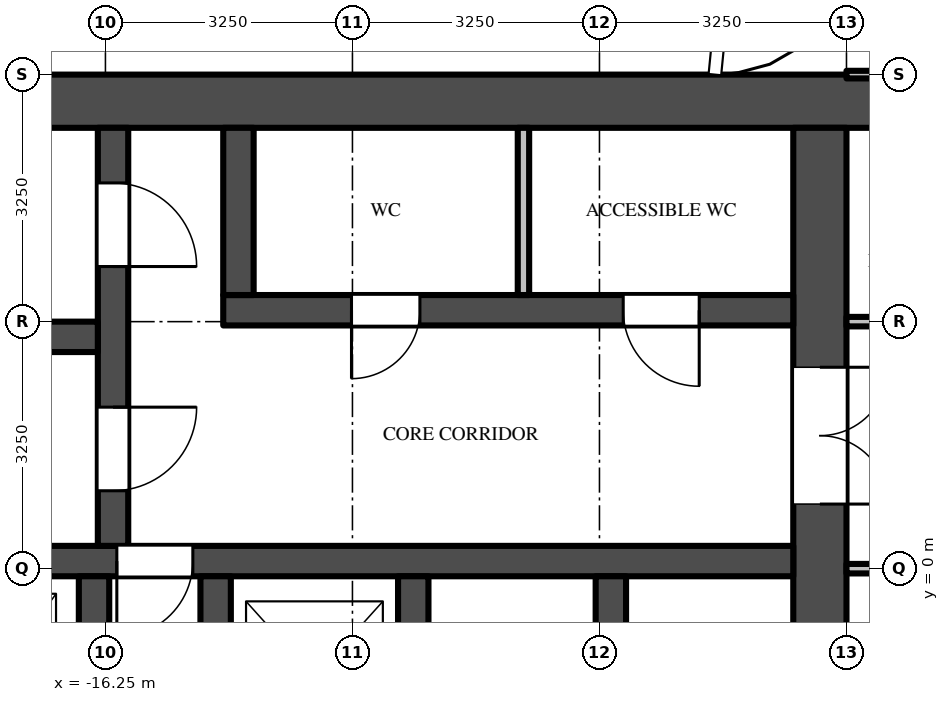
"""IFC4 building model, lengths in metres.
Left out: names, types, materials, properties, quantities, classifications, styles, units other than length and angle.
Written with IfcOpenShell. Run it as: python <this file> out.ifc"""

import sys

from ifc_helpers import new_model, si_unit, direction, frame, frame_2d, origin, place, context, subcontext, project, spatial, rectangle, extrude, source, transform, mapped, element, fill, save


model = new_model("IFC4")
c1 = context("Model", 3, precision=1e-05, world=origin(), true_north=direction((0.0, 1.0)))
c2 = subcontext(c1, "Body", "Model", "MODEL_VIEW")
j1 = project(units=[si_unit("LENGTHUNIT", "METRE"), si_unit("PLANEANGLEUNIT", "RADIAN")], contexts=[c1])
p1 = place(None, origin())
s1 = spatial("IfcSite", under=j1, at=p1, CompositionType="ELEMENT")
p2 = place(p1, origin())
s2 = spatial("IfcBuilding", under=s1, at=p2, CompositionType="ELEMENT")
p3 = place(p2, frame((0.0, 0.0, 267.5)))
s3 = spatial("IfcBuildingStorey", under=s2, at=p3, CompositionType="ELEMENT", Elevation=267.5)
m1 = source(origin(), c2, "Body", "SweptSolid", [
    extrude(rectangle(XDim=16.6, YDim=0.7, at=frame_2d((8.3, 0.0))), origin(), (0.0, 0.0, 1.0), 3.45),
])
p4 = place(p3, frame((-6.15, 6.15, 0.0), z_axis=(0.0, 0.0, 1.0), x_axis=(-1.0, 0.0, 0.0)))
e1 = element("IfcWall", 1, at=p4, inside=s3, PredefinedType="SHEAR", context=c2, shape_type="MappedRepresentation", body=[
    mapped(m1, transform((0.0, 0.0, 0.0))),
])
m2 = source(origin(), c2, "Body", "SweptSolid", [
    extrude(rectangle(XDim=9.05, YDim=0.7, at=frame_2d((4.525, 0.0))), origin(), (0.0, 0.0, 1.0), 3.45),
])
p5 = place(p3, frame((-6.85, 5.8, 0.0), z_axis=(0.0, 0.0, 1.0), x_axis=(0.0, -1.0, 0.0)))
e2 = element("IfcWall", 2, at=p5, inside=s3, PredefinedType="SHEAR", context=c2, shape_type="MappedRepresentation", body=[
    mapped(m2, transform((0.0, 0.0, 0.0))),
])
m3 = source(origin(), c2, "Body", "SweptSolid", [
    extrude(rectangle(XDim=1.8, YDim=2.1, at=frame_2d((0.9, 1.05))), frame((0.0, 0.36, 0.0), z_axis=(0.0, -1.0, 0.0), x_axis=(1.0, 0.0, 0.0)), (0.0, 0.0, 1.0), 0.72),
])
p6 = place(p5, frame((3.15, 0.0, 0.0)))
e3 = element("IfcOpeningElement", 3, at=p6, cuts=e2, PredefinedType="OPENING", context=c2, shape_type="MappedRepresentation", body=[
    mapped(m3, transform((0.0, 0.0, 0.0))),
])
m4 = source(origin(), c2, "Body", "SweptSolid", [
    extrude(rectangle(XDim=7.5, YDim=0.4, at=frame_2d((3.75, 0.0))), origin(), (0.0, 0.0, 1.0), 3.45),
])
p7 = place(p3, frame((-7.2, 3.4, 0.0), z_axis=(0.0, 0.0, 1.0), x_axis=(-1.0, 0.0, 0.0)))
e4 = element("IfcWall", 4, at=p7, inside=s3, PredefinedType="SHEAR", context=c2, shape_type="MappedRepresentation", body=[
    mapped(m4, transform((0.0, 0.0, 0.0))),
])
m5 = source(origin(), c2, "Body", "SweptSolid", [
    extrude(rectangle(XDim=1.0, YDim=2.1, at=frame_2d((0.5, 1.05))), frame((0.0, 0.21, 0.0), z_axis=(0.0, -1.0, 0.0), x_axis=(1.0, 0.0, 0.0)), (0.0, 0.0, 1.0), 0.42),
])
p8 = place(p7, frame((1.238, 0.0, 0.0)))
e5 = element("IfcOpeningElement", 5, at=p8, cuts=e4, PredefinedType="OPENING", context=c2, shape_type="MappedRepresentation", body=[
    mapped(m5, transform((0.0, 0.0, 0.0))),
])
m6 = source(origin(), c2, "Body", "SweptSolid", [
    extrude(rectangle(XDim=0.9, YDim=2.1, at=frame_2d((0.45, 1.05))), frame((0.0, 0.21, 0.0), z_axis=(0.0, -1.0, 0.0), x_axis=(1.0, 0.0, 0.0)), (0.0, 0.0, 1.0), 0.42),
])
p9 = place(p7, frame((4.913, 0.0, 0.0)))
e6 = element("IfcOpeningElement", 6, at=p9, cuts=e4, PredefinedType="OPENING", context=c2, shape_type="MappedRepresentation", body=[
    mapped(m6, transform((0.0, 0.0, 0.0))),
])
m7 = source(origin(), c2, "Body", "SweptSolid", [
    extrude(rectangle(XDim=14.85, YDim=0.4, at=frame_2d((7.425, 0.0))), origin(), (0.0, 0.0, 1.0), 3.45),
])
p10 = place(p3, frame((-7.2, 0.1, 0.0), z_axis=(0.0, 0.0, 1.0), x_axis=(-1.0, 0.0, 0.0)))
e7 = element("IfcWall", 7, at=p10, inside=s3, PredefinedType="SHEAR", context=c2, shape_type="MappedRepresentation", body=[
    mapped(m7, transform((0.0, 0.0, 0.0))),
])
p11 = place(p10, frame((7.9, 0.0, 0.0)))
e8 = element("IfcOpeningElement", 8, at=p11, cuts=e7, PredefinedType="OPENING", context=c2, shape_type="MappedRepresentation", body=[
    mapped(m5, transform((0.0, 0.0, 0.0))),
])
m8 = source(origin(), c2, "Body", "SweptSolid", [
    extrude(rectangle(XDim=5.5, YDim=0.4, at=frame_2d((2.75, 0.0))), origin(), (0.0, 0.0, 1.0), 3.45),
])
p12 = place(p3, frame((-16.15, 5.8, 0.0), z_axis=(0.0, 0.0, 1.0), x_axis=(0.0, -1.0, 0.0)))
e9 = element("IfcWall", 9, at=p12, inside=s3, PredefinedType="SHEAR", context=c2, shape_type="MappedRepresentation", body=[
    mapped(m8, transform((0.0, 0.0, 0.0))),
])
m9 = source(origin(), c2, "Body", "SweptSolid", [
    extrude(rectangle(XDim=1.1, YDim=2.1, at=frame_2d((0.55, 1.05))), frame((0.0, 0.21, 0.0), z_axis=(0.0, -1.0, 0.0), x_axis=(1.0, 0.0, 0.0)), (0.0, 0.0, 1.0), 0.42),
])
p13 = place(p12, frame((0.725, 0.0, 0.0)))
e10 = element("IfcOpeningElement", 10, at=p13, cuts=e9, PredefinedType="OPENING", context=c2, shape_type="MappedRepresentation", body=[
    mapped(m9, transform((0.0, 0.0, 0.0))),
])
p14 = place(p12, frame((3.675, 0.0, 0.0)))
e11 = element("IfcOpeningElement", 11, at=p14, cuts=e9, PredefinedType="OPENING", context=c2, shape_type="MappedRepresentation", body=[
    mapped(m9, transform((0.0, 0.0, 0.0))),
])
m10 = source(origin(), c2, "Body", "SweptSolid", [
    extrude(rectangle(XDim=5.7, YDim=0.4, at=frame_2d((2.85, 0.0))), origin(), (0.0, 0.0, 1.0), 3.45),
])
p15 = place(p3, frame((-16.35, 3.05, 0.0), z_axis=(0.0, 0.0, 1.0), x_axis=(-1.0, 0.0, 0.0)))
e12 = element("IfcWall", 12, at=p15, inside=s3, PredefinedType="SHEAR", context=c2, shape_type="MappedRepresentation", body=[
    mapped(m10, transform((0.0, 0.0, 0.0))),
])
m11 = source(origin(), c2, "Body", "SweptSolid", [
    extrude(rectangle(XDim=2.2, YDim=0.4, at=frame_2d((1.1, 0.0))), origin(), (0.0, 0.0, 1.0), 3.45),
])
p16 = place(p3, frame((-14.5, 5.8, 0.0), z_axis=(0.0, 0.0, 1.0), x_axis=(0.0, -1.0, 0.0)))
e13 = element("IfcWall", 13, at=p16, inside=s3, PredefinedType="SHEAR", context=c2, shape_type="MappedRepresentation", body=[
    mapped(m11, transform((0.0, 0.0, 0.0))),
])
m12 = source(origin(), c2, "Body", "SweptSolid", [
    extrude(rectangle(XDim=2.45, YDim=0.4, at=frame_2d((1.225, 0.0))), origin(), (0.0, 0.0, 1.0), 3.45),
])
for number, where, z_axis, x_axis in (
    (14, (-9.6, -0.1, 0.0), (0.0, 0.0, 1.0), (0.0, -1.0, 0.0)),
    (15, (-12.2, -0.1, 0.0), (0.0, 0.0, 1.0), (0.0, -1.0, 0.0)),
    (16, (-14.8, -0.1, 0.0), (0.0, 0.0, 1.0), (0.0, -1.0, 0.0)),
    (17, (-16.4, -0.1, 0.0), (0.0, 0.0, 1.0), (0.0, -1.0, 0.0)),
):
    element("IfcWall", number, at=place(p3, frame(where, z_axis=z_axis, x_axis=x_axis)), inside=s3, PredefinedType="SHEAR", context=c2, shape_type="MappedRepresentation", body=[
        mapped(m12, transform((0.0, 0.0, 0.0))),
    ])
m13 = source(origin(), c2, "Body", "SweptSolid", [
    extrude(rectangle(XDim=2.2, YDim=0.15, at=frame_2d((1.1, 0.0))), origin(), (0.0, 0.0, 1.0), 3.45),
])
p17 = place(p3, frame((-10.75, 5.8, 0.0), z_axis=(0.0, 0.0, 1.0), x_axis=(0.0, -1.0, 0.0)))
e18 = element("IfcWall", 18, at=p17, inside=s3, PredefinedType="PARTITIONING", context=c2, shape_type="MappedRepresentation", body=[
    mapped(m13, transform((0.0, 0.0, 0.0))),
])
m14 = source(origin(), c2, "Body", "SweptSolid", [
    extrude(rectangle(XDim=5.363, YDim=0.125, at=frame_2d((2.681, 0.0))), origin(), (0.0, 0.0, 1.0), 2.668),
])
p18 = place(p3, frame((-1.137, 0.0, 0.0), z_axis=(0.0, 0.0, 1.0), x_axis=(-1.0, 0.0, 0.0)))
e19 = element("IfcWall", 19, at=p18, inside=s3, PredefinedType="PARTITIONING", context=c2, shape_type="MappedRepresentation", body=[
    mapped(m14, transform((0.0, 0.0, 0.0))),
])
p19 = place(p3, frame((-6.5, 3.25, 0.0), z_axis=(0.0, 0.0, 1.0), x_axis=(1.0, 0.0, 0.0)))
e20 = element("IfcWall", 20, at=p19, inside=s3, PredefinedType="PARTITIONING", context=c2, shape_type="MappedRepresentation", body=[
    mapped(m14, transform((0.0, 0.0, 0.0))),
])
m15 = source(origin(), c2, "Body", "SweptSolid", [
    extrude(rectangle(XDim=1.0, YDim=2.1, at=frame_2d((0.5, 1.05))), frame((0.0, 0.073, 0.0), z_axis=(0.0, -1.0, 0.0), x_axis=(1.0, 0.0, 0.0)), (0.0, 0.0, 1.0), 0.145),
])
p20 = place(p19, frame((1.3, 0.0, 0.0)))
e21 = element("IfcOpeningElement", 21, at=p20, cuts=e20, PredefinedType="OPENING", context=c2, shape_type="MappedRepresentation", body=[
    mapped(m15, transform((0.0, 0.0, 0.0))),
])
m16 = source(origin(), c2, "Body", "SweptSolid", [
    extrude(rectangle(XDim=5.238, YDim=0.1, at=frame_2d((2.619, 0.0))), origin(), (0.0, 0.0, 1.0), 2.53),
])
p21 = place(p3, frame((-6.5, 6.5, 0.0), z_axis=(0.0, 0.0, 1.0), x_axis=(1.0, 0.0, 0.0)))
e22 = element("IfcWall", 22, at=p21, inside=s3, PredefinedType="PARTITIONING", context=c2, shape_type="MappedRepresentation", body=[
    mapped(m16, transform((0.0, 0.0, 0.0))),
])
m17 = source(origin(), c2, "Body", "SweptSolid", [
    extrude(rectangle(XDim=1.8, YDim=2.1, at=frame_2d((0.9, 1.05))), frame((0.0, -0.275, 0.0), z_axis=(0.0, -1.0, 0.0), x_axis=(1.0, 0.0, 0.0)), (0.0, 0.0, 1.0), 0.05),
])
p22 = place(p6, origin())
e23 = element("IfcDoor", 23, at=p22, inside=s3, OperationType="DOUBLE_DOOR_SINGLE_SWING", PredefinedType="DOOR", context=c2, shape_type="MappedRepresentation", body=[
    mapped(m17, transform((0.0, 0.0, 0.0))),
])
fill(e3, e23)
m18 = source(origin(), c2, "Body", "SweptSolid", [
    extrude(rectangle(XDim=1.1, YDim=2.1, at=frame_2d((0.55, 1.05))), frame((0.0, 0.025, 0.0), z_axis=(0.0, -1.0, 0.0), x_axis=(1.0, 0.0, 0.0)), (0.0, 0.0, 1.0), 0.05),
])
p23 = place(p13, origin())
e24 = element("IfcDoor", 24, at=p23, inside=s3, OperationType="SINGLE_SWING_RIGHT", PredefinedType="DOOR", context=c2, shape_type="MappedRepresentation", body=[
    mapped(m18, transform((0.0, 0.0, 0.0))),
])
fill(e10, e24)
p24 = place(p14, origin())
e25 = element("IfcDoor", 25, at=p24, inside=s3, OperationType="SINGLE_SWING_LEFT", PredefinedType="DOOR", context=c2, shape_type="MappedRepresentation", body=[
    mapped(m18, transform((0.0, 0.0, 0.0))),
])
fill(e11, e25)
m19 = source(origin(), c2, "Body", "SweptSolid", [
    extrude(rectangle(XDim=1.0, YDim=2.1, at=frame_2d((0.5, 1.05))), frame((0.0, 0.025, 0.0), z_axis=(0.0, -1.0, 0.0), x_axis=(1.0, 0.0, 0.0)), (0.0, 0.0, 1.0), 0.05),
])
p25 = place(p11, origin())
e26 = element("IfcDoor", 26, at=p25, inside=s3, OperationType="SINGLE_SWING_RIGHT", PredefinedType="DOOR", context=c2, shape_type="MappedRepresentation", body=[
    mapped(m19, transform((0.0, 0.0, 0.0))),
])
fill(e8, e26)
p26 = place(p8, origin())
e27 = element("IfcDoor", 27, at=p26, inside=s3, OperationType="SINGLE_SWING_LEFT", PredefinedType="DOOR", context=c2, shape_type="MappedRepresentation", body=[
    mapped(m19, transform((0.0, 0.0, 0.0))),
])
fill(e5, e27)
m20 = source(origin(), c2, "Body", "SweptSolid", [
    extrude(rectangle(XDim=0.9, YDim=2.1, at=frame_2d((0.45, 1.05))), frame((0.0, 0.025, 0.0), z_axis=(0.0, -1.0, 0.0), x_axis=(1.0, 0.0, 0.0)), (0.0, 0.0, 1.0), 0.05),
])
p27 = place(p9, origin())
e28 = element("IfcDoor", 28, at=p27, inside=s3, OperationType="SINGLE_SWING_RIGHT", PredefinedType="DOOR", context=c2, shape_type="MappedRepresentation", body=[
    mapped(m20, transform((0.0, 0.0, 0.0))),
])
fill(e6, e28)
save(model, sys.argv[1])
